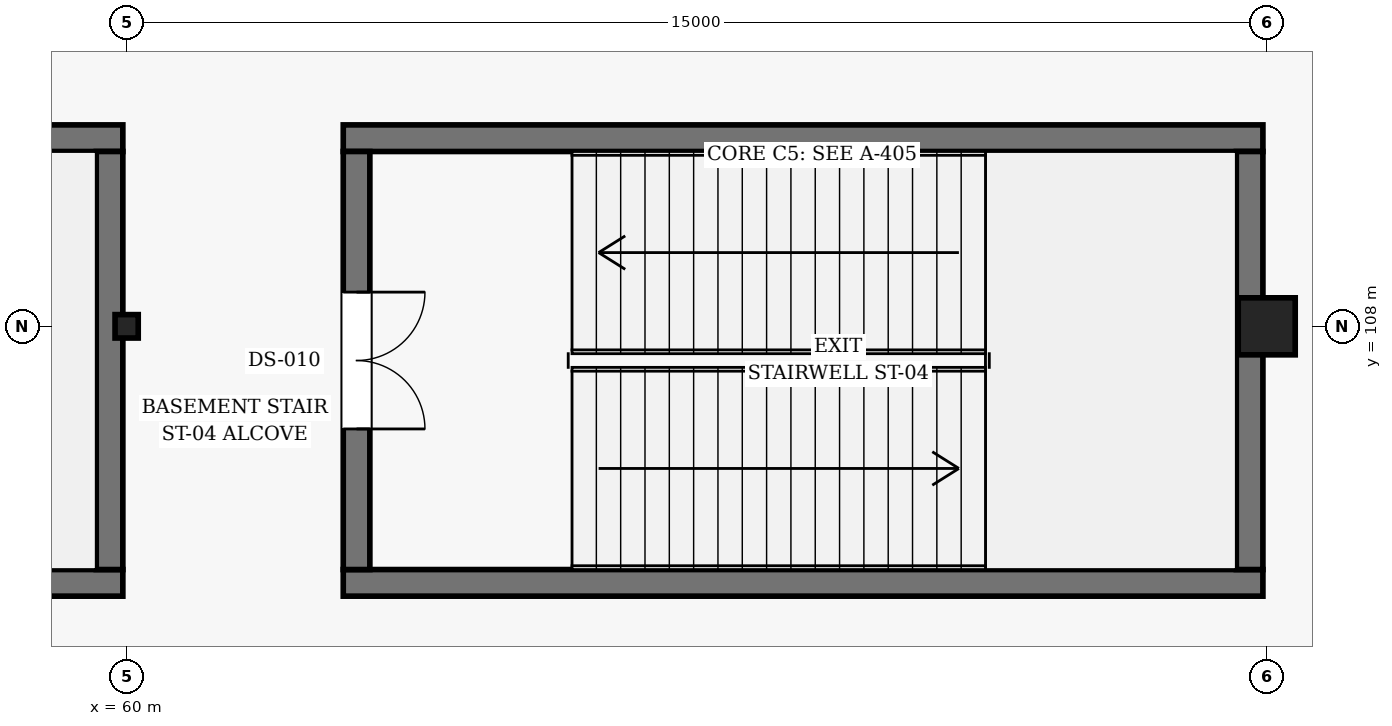
"""IFC4 building model, lengths in metres.
Left out: names, types, materials, properties, quantities, classifications, styles, units other than length and angle.
Written with IfcOpenShell. Run it as: python <this file> out.ifc"""

import sys

from ifc_helpers import new_model, si_unit, direction, frame, frame_2d, origin, origin_2d, place, context, subcontext, project, spatial, rectangle, i_section, extrude, element, fill, save


model = new_model("IFC4")
c1 = context("Model", 3, precision=1e-05, world=origin(), true_north=direction((0.0, 1.0)))
c2 = subcontext(c1, "Body", "Model", "MODEL_VIEW")
j1 = project(units=[si_unit("LENGTHUNIT", "METRE"), si_unit("PLANEANGLEUNIT", "RADIAN")], contexts=[c1])
p1 = place(None, origin())
s1 = spatial("IfcSite", under=j1, at=p1, CompositionType="ELEMENT")
p2 = place(p1, origin())
s2 = spatial("IfcBuilding", under=s1, at=p2, CompositionType="ELEMENT")
p3 = place(p2, frame((0.0, 0.0, -5.4)))
s3 = spatial("IfcBuildingStorey", under=s2, at=p3, CompositionType="ELEMENT", Elevation=-5.4)
p4 = place(p3, frame((60.0, 108.0, 0.0), z_axis=(0.0, 0.0, 1.0), x_axis=(1.0, 0.0, 0.0)))
e1 = element("IfcColumn", 1, at=p4, inside=s3, PredefinedType="COLUMN", context=c2, shape_type="SweptSolid", body=[
    extrude(i_section(OverallWidth=0.305, OverallDepth=0.308, WebThickness=0.01, FlangeThickness=0.015, FilletRadius=0.015, at=origin_2d()), origin(), (0.0, 0.0, 1.0), 5.4),
])
p5 = place(p3, frame((75.0, 108.0, 0.0), z_axis=(0.0, 0.0, 1.0), x_axis=(1.0, 0.0, 0.0)))
e2 = element("IfcColumn", 2, at=p5, inside=s3, PredefinedType="COLUMN", context=c2, shape_type="SweptSolid", body=[
    extrude(rectangle(XDim=0.75, YDim=0.75, at=origin_2d()), origin(), (0.0, 0.0, 1.0), 5.4),
])
for number, where, z_axis, x_axis in (
    (3, (47.85, 104.625, 0.0), (0.0, 0.0, 1.0), (1.0, 0.0, 0.0)),
    (4, (59.95, 110.475, 0.0), (0.0, 0.0, 1.0), (-1.0, 0.0, 0.0)),
):
    element("IfcWall", number, at=place(p3, frame(where, z_axis=z_axis, x_axis=x_axis)), inside=s3, PredefinedType="SHEAR", context=c2, shape_type="SweptSolid", body=[
        extrude(rectangle(XDim=12.1, YDim=0.35, at=frame_2d((6.05, 0.0))), origin(), (0.0, 0.0, 1.0), 5.08),
    ])
p6 = place(p3, frame((59.775, 104.8, 0.0), z_axis=(0.0, 0.0, 1.0), x_axis=(0.0, 1.0, 0.0)))
e5 = element("IfcWall", 5, at=p6, inside=s3, PredefinedType="SHEAR", context=c2, shape_type="SweptSolid", body=[
    extrude(rectangle(XDim=5.5, YDim=0.35, at=frame_2d((2.75, 0.0))), origin(), (0.0, 0.0, 1.0), 5.08),
])
for number, where, z_axis, x_axis in (
    (6, (62.85, 104.625, 0.0), (0.0, 0.0, 1.0), (1.0, 0.0, 0.0)),
    (7, (74.95, 110.475, 0.0), (0.0, 0.0, 1.0), (-1.0, 0.0, 0.0)),
):
    element("IfcWall", number, at=place(p3, frame(where, z_axis=z_axis, x_axis=x_axis)), inside=s3, PredefinedType="SHEAR", context=c2, shape_type="SweptSolid", body=[
        extrude(rectangle(XDim=12.1, YDim=0.35, at=frame_2d((6.05, 0.0))), origin(), (0.0, 0.0, 1.0), 5.08),
    ])
p7 = place(p3, frame((63.025, 110.3, 0.0), z_axis=(0.0, 0.0, 1.0), x_axis=(0.0, -1.0, 0.0)))
e8 = element("IfcWall", 8, at=p7, inside=s3, PredefinedType="SHEAR", context=c2, shape_type="SweptSolid", body=[
    extrude(rectangle(XDim=5.5, YDim=0.35, at=frame_2d((2.75, 0.0))), origin(), (0.0, 0.0, 1.0), 5.08),
])
p8 = place(p7, frame((1.85, 0.0, 0.0)))
e9 = element("IfcOpeningElement", 9, at=p8, cuts=e8, PredefinedType="OPENING", context=c2, shape_type="SweptSolid", body=[
    extrude(rectangle(XDim=1.8, YDim=2.2, at=frame_2d((0.9, 1.1))), frame((0.0, 0.185, 0.0), z_axis=(0.0, -1.0, 0.0), x_axis=(1.0, 0.0, 0.0)), (0.0, 0.0, 1.0), 0.37),
])
p9 = place(p3, frame((74.775, 104.8, 0.0), z_axis=(0.0, 0.0, 1.0), x_axis=(0.0, 1.0, 0.0)))
e10 = element("IfcWall", 10, at=p9, inside=s3, PredefinedType="SHEAR", context=c2, shape_type="SweptSolid", body=[
    extrude(rectangle(XDim=5.5, YDim=0.35, at=frame_2d((2.75, 0.0))), origin(), (0.0, 0.0, 1.0), 5.08),
])
p10 = place(p8, origin())
e11 = element("IfcDoor", 11, at=p10, inside=s3, OperationType="DOUBLE_DOOR_SINGLE_SWING", PredefinedType="DOOR", context=c2, shape_type="SweptSolid", body=[
    extrude(rectangle(XDim=1.8, YDim=2.2, at=frame_2d((0.9, 1.1))), frame((0.0, 0.025, 0.0), z_axis=(0.0, -1.0, 0.0), x_axis=(1.0, 0.0, 0.0)), (0.0, 0.0, 1.0), 0.05),
])
fill(e9, e11)
save(model, sys.argv[1])
